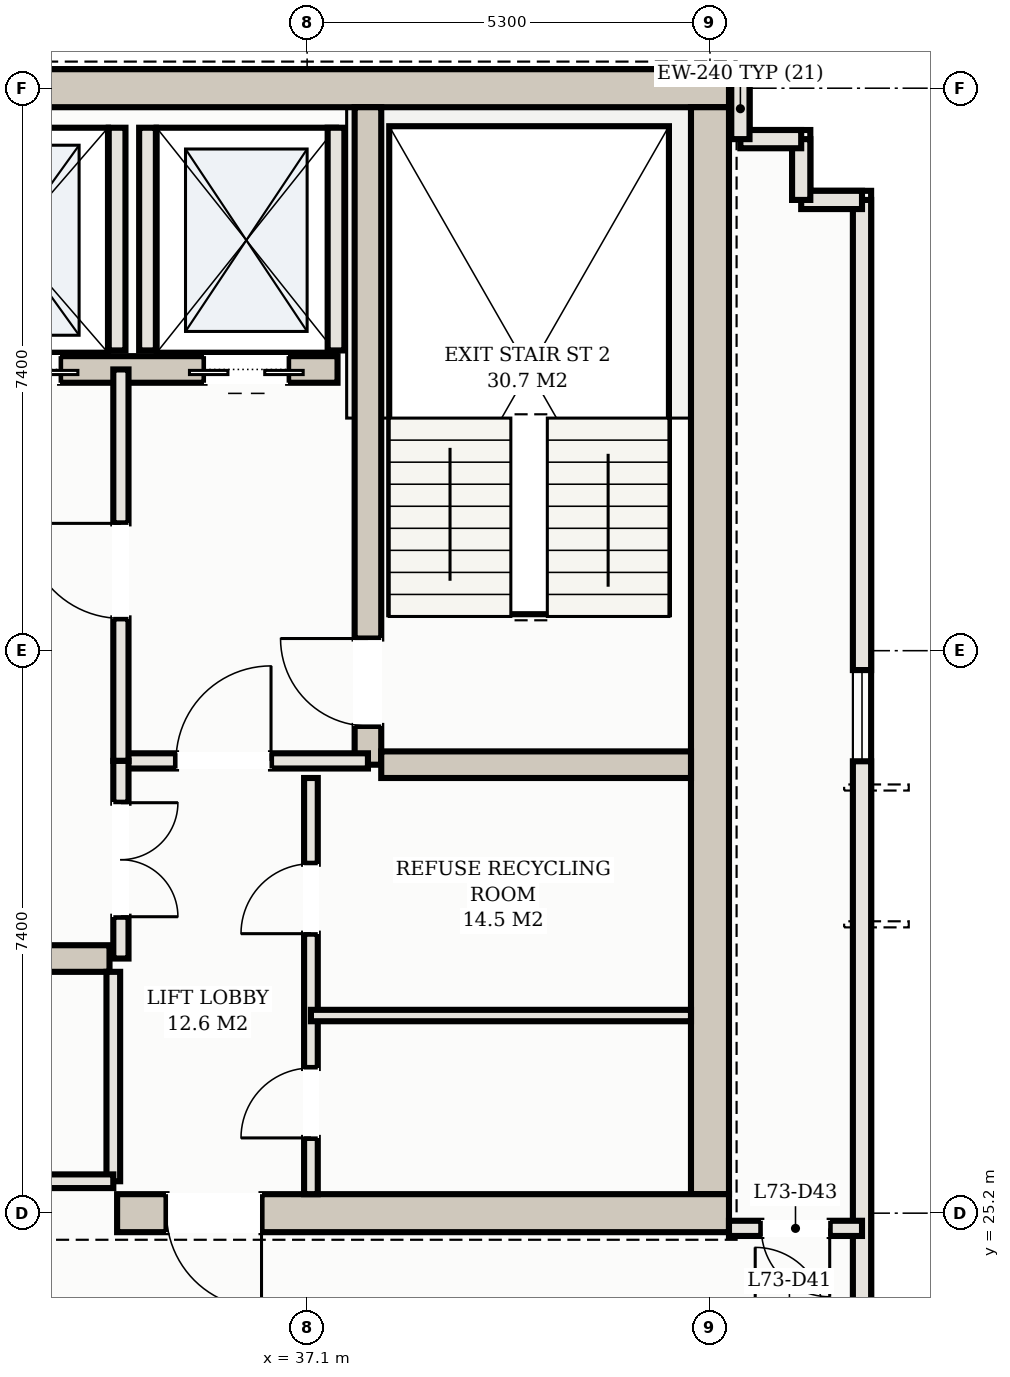
"""IFC4 building model, lengths in metres.
Left out: names, types, materials, properties, quantities, classifications, styles, units other than length and angle.
Written with IfcOpenShell. Run it as: python <this file> out.ifc"""

import sys

from ifc_helpers import new_model, si_unit, direction, frame, frame_2d, origin, place, context, subcontext, project, spatial, rectangle, extrude, element, fill, save


model = new_model("IFC4")
c1 = context("Model", 3, precision=1e-05, world=origin(), true_north=direction((0.0, 1.0)))
c2 = subcontext(c1, "Body", "Model", "MODEL_VIEW")
j1 = project(units=[si_unit("LENGTHUNIT", "METRE"), si_unit("PLANEANGLEUNIT", "RADIAN")], contexts=[c1])
p1 = place(None, origin())
s1 = spatial("IfcSite", under=j1, at=p1, CompositionType="ELEMENT")
p2 = place(p1, origin())
s2 = spatial("IfcBuilding", under=s1, at=p2, CompositionType="ELEMENT")
p3 = place(p2, frame((0.0, 0.0, 262.7)))
s3 = spatial("IfcBuildingStorey", under=s2, at=p3, CompositionType="ELEMENT", Elevation=262.7)
p4 = place(p3, frame((10.35, 40.0, 0.0), z_axis=(0.0, 0.0, 1.0), x_axis=(1.0, 0.0, 0.0)))
e1 = element("IfcWall", 1, at=p4, inside=s3, PredefinedType="SHEAR", context=c2, shape_type="SweptSolid", body=[
    extrude(rectangle(XDim=32.3, YDim=0.5, at=frame_2d((16.15, 0.0))), origin(), (0.0, 0.0, 1.0), 3.04),
])
p5 = place(p3, frame((42.4, 25.45, 0.0), z_axis=(0.0, 0.0, 1.0), x_axis=(0.0, 1.0, 0.0)))
e2 = element("IfcWall", 2, at=p5, inside=s3, PredefinedType="SHEAR", context=c2, shape_type="SweptSolid", body=[
    extrude(rectangle(XDim=14.3, YDim=0.5, at=frame_2d((7.15, 0.0))), origin(), (0.0, 0.0, 1.0), 3.04),
])
p6 = place(p3, frame((34.6, 25.2, 0.0), z_axis=(0.0, 0.0, 1.0), x_axis=(1.0, 0.0, 0.0)))
e3 = element("IfcWall", 3, at=p6, inside=s3, PredefinedType="SHEAR", context=c2, shape_type="SweptSolid", body=[
    extrude(rectangle(XDim=8.05, YDim=0.5, at=frame_2d((4.025, 0.0))), origin(), (0.0, 0.0, 1.0), 3.04),
])
p7 = place(p6, frame((0.65, 0.0, 0.0)))
e4 = element("IfcOpeningElement", 4, at=p7, cuts=e3, PredefinedType="OPENING", context=c2, shape_type="SweptSolid", body=[
    extrude(rectangle(XDim=1.25, YDim=2.2, at=frame_2d((0.625, 1.1))), frame((0.0, 0.26, 0.0), z_axis=(0.0, -1.0, 0.0), x_axis=(1.0, 0.0, 0.0)), (0.0, 0.0, 1.0), 0.52),
])
p8 = place(p3, frame((37.9, 31.1, 0.0), z_axis=(0.0, 0.0, 1.0), x_axis=(0.0, 1.0, 0.0)))
e5 = element("IfcWall", 5, at=p8, inside=s3, PredefinedType="SHEAR", context=c2, shape_type="SweptSolid", body=[
    extrude(rectangle(XDim=8.65, YDim=0.35, at=frame_2d((4.325, 0.0))), origin(), (0.0, 0.0, 1.0), 3.04),
])
p9 = place(p8, frame((0.51, 0.0, 0.0)))
e6 = element("IfcOpeningElement", 6, at=p9, cuts=e5, PredefinedType="OPENING", context=c2, shape_type="SweptSolid", body=[
    extrude(rectangle(XDim=1.15, YDim=2.2, at=frame_2d((0.575, 1.1))), frame((0.0, 0.185, 0.0), z_axis=(0.0, -1.0, 0.0), x_axis=(1.0, 0.0, 0.0)), (0.0, 0.0, 1.0), 0.37),
])
p10 = place(p3, frame((38.075, 31.1, 0.0), z_axis=(0.0, 0.0, 1.0), x_axis=(1.0, 0.0, 0.0)))
e7 = element("IfcWall", 7, at=p10, inside=s3, PredefinedType="SHEAR", context=c2, shape_type="SweptSolid", body=[
    extrude(rectangle(XDim=4.075, YDim=0.35, at=frame_2d((2.038, 0.0))), origin(), (0.0, 0.0, 1.0), 3.04),
])
p11 = place(p3, frame((15.5, 36.3, 0.0), z_axis=(0.0, 0.0, 1.0), x_axis=(1.0, 0.0, 0.0)))
e8 = element("IfcWall", 8, at=p11, inside=s3, PredefinedType="SHEAR", context=c2, shape_type="SweptSolid", body=[
    extrude(rectangle(XDim=22.0, YDim=0.35, at=frame_2d((11.0, 0.0))), origin(), (0.0, 0.0, 1.0), 3.04),
])
p12 = place(p11, frame((0.65, 0.0, 0.0)))
e9 = element("IfcOpeningElement", 9, at=p12, cuts=e8, PredefinedType="OPENING", context=c2, shape_type="SweptSolid", body=[
    extrude(rectangle(XDim=1.1, YDim=2.15, at=frame_2d((0.55, 1.075))), frame((0.0, 0.185, 0.0), z_axis=(0.0, -1.0, 0.0), x_axis=(1.0, 0.0, 0.0)), (0.0, 0.0, 1.0), 0.37),
])
p13 = place(p11, frame((20.25, 0.0, 0.0)))
e10 = element("IfcOpeningElement", 10, at=p13, cuts=e8, PredefinedType="OPENING", context=c2, shape_type="SweptSolid", body=[
    extrude(rectangle(XDim=1.1, YDim=2.15, at=frame_2d((0.55, 1.075))), frame((0.0, 0.185, 0.0), z_axis=(0.0, -1.0, 0.0), x_axis=(1.0, 0.0, 0.0)), (0.0, 0.0, 1.0), 0.37),
])
p14 = place(p11, frame((17.05, 0.0, 0.0)))
e11 = element("IfcOpeningElement", 11, at=p14, cuts=e8, PredefinedType="OPENING", context=c2, shape_type="SweptSolid", body=[
    extrude(rectangle(XDim=1.3, YDim=2.2, at=frame_2d((0.65, 1.1))), frame((0.0, 0.185, 0.0), z_axis=(0.0, -1.0, 0.0), x_axis=(1.0, 0.0, 0.0)), (0.0, 0.0, 1.0), 0.37),
])
p15 = place(p11, frame((3.95, 0.0, 0.0)))
e12 = element("IfcOpeningElement", 12, at=p15, cuts=e8, PredefinedType="OPENING", context=c2, shape_type="SweptSolid", body=[
    extrude(rectangle(XDim=1.1, YDim=2.15, at=frame_2d((0.55, 1.075))), frame((0.0, 0.185, 0.0), z_axis=(0.0, -1.0, 0.0), x_axis=(1.0, 0.0, 0.0)), (0.0, 0.0, 1.0), 0.37),
])
p16 = place(p11, frame((6.55, 0.0, 0.0)))
e13 = element("IfcOpeningElement", 13, at=p16, cuts=e8, PredefinedType="OPENING", context=c2, shape_type="SweptSolid", body=[
    extrude(rectangle(XDim=1.1, YDim=2.15, at=frame_2d((0.55, 1.075))), frame((0.0, 0.185, 0.0), z_axis=(0.0, -1.0, 0.0), x_axis=(1.0, 0.0, 0.0)), (0.0, 0.0, 1.0), 0.37),
])
p17 = place(p11, frame((9.15, 0.0, 0.0)))
e14 = element("IfcOpeningElement", 14, at=p17, cuts=e8, PredefinedType="OPENING", context=c2, shape_type="SweptSolid", body=[
    extrude(rectangle(XDim=1.1, YDim=2.15, at=frame_2d((0.55, 1.075))), frame((0.0, 0.185, 0.0), z_axis=(0.0, -1.0, 0.0), x_axis=(1.0, 0.0, 0.0)), (0.0, 0.0, 1.0), 0.37),
])
p18 = place(p3, frame((18.5, 28.55, 0.0), z_axis=(0.0, 0.0, 1.0), x_axis=(1.0, 0.0, 0.0)))
e15 = element("IfcWall", 15, at=p18, inside=s3, PredefinedType="SHEAR", context=c2, shape_type="SweptSolid", body=[
    extrude(rectangle(XDim=16.0, YDim=0.35, at=frame_2d((8.0, 0.0))), origin(), (0.0, 0.0, 1.0), 3.04),
])
for number, where, z_axis, x_axis in (
    (16, (35.0, 36.55, 0.0), (0.0, 0.0, 1.0), (0.0, 1.0, 0.0)),
    (17, (37.48, 36.55, 0.0), (0.0, 0.0, 1.0), (0.0, 1.0, 0.0)),
    (18, (34.6, 36.55, 0.0), (0.0, 0.0, 1.0), (0.0, 1.0, 0.0)),
):
    element("IfcWall", number, at=place(p3, frame(where, z_axis=z_axis, x_axis=x_axis)), inside=s3, PredefinedType="SOLIDWALL", context=c2, shape_type="SweptSolid", body=[
        extrude(rectangle(XDim=2.93, YDim=0.22, at=frame_2d((1.465, 0.0))), origin(), (0.0, 0.0, 1.0), 3.04),
    ])
p19 = place(p3, frame((44.4, 12.52, 0.0), z_axis=(0.0, 0.0, 1.0), x_axis=(0.0, 1.0, 0.0)))
e19 = element("IfcWall", 19, at=p19, inside=s3, PredefinedType="SOLIDWALL", context=c2, shape_type="SweptSolid", body=[
    extrude(rectangle(XDim=26.01, YDim=0.24, at=frame_2d((13.005, 0.0))), origin(), (0.0, 0.0, 1.0), 3.04),
])
p20 = place(p19, frame((4.48, 0.0, 0.0)))
e20 = element("IfcOpeningElement", 20, at=p20, cuts=e19, PredefinedType="OPENING", context=c2, shape_type="SweptSolid", body=[
    extrude(rectangle(XDim=1.8, YDim=2.2, at=frame_2d((0.9, 1.1))), frame((0.0, 0.13, 0.0), z_axis=(0.0, -1.0, 0.0), x_axis=(1.0, 0.0, 0.0)), (0.0, 0.0, 1.0), 0.26),
])
p21 = place(p19, frame((0.426, 0.0, 0.75)))
e21 = element("IfcOpeningElement", 21, at=p21, cuts=e19, PredefinedType="OPENING", context=c2, shape_type="SweptSolid", body=[
    extrude(rectangle(XDim=1.5, YDim=1.6, at=frame_2d((0.75, 0.8))), frame((0.0, 0.13, 0.0), z_axis=(0.0, -1.0, 0.0), x_axis=(1.0, 0.0, 0.0)), (0.0, 0.0, 1.0), 0.26),
])
p22 = place(p19, frame((2.784, 0.0, 0.75)))
e22 = element("IfcOpeningElement", 22, at=p22, cuts=e19, PredefinedType="OPENING", context=c2, shape_type="SweptSolid", body=[
    extrude(rectangle(XDim=1.2, YDim=1.5, at=frame_2d((0.6, 0.75))), frame((0.0, 0.13, 0.0), z_axis=(0.0, -1.0, 0.0), x_axis=(1.0, 0.0, 0.0)), (0.0, 0.0, 1.0), 0.26),
])
p23 = place(p19, frame((8.185, 0.0, 0.75)))
e23 = element("IfcOpeningElement", 23, at=p23, cuts=e19, PredefinedType="OPENING", context=c2, shape_type="SweptSolid", body=[
    extrude(rectangle(XDim=1.2, YDim=1.5, at=frame_2d((0.6, 0.75))), frame((0.0, 0.13, 0.0), z_axis=(0.0, -1.0, 0.0), x_axis=(1.0, 0.0, 0.0)), (0.0, 0.0, 1.0), 0.26),
])
p24 = place(p19, frame((18.625, 0.0, 0.75)))
e24 = element("IfcOpeningElement", 24, at=p24, cuts=e19, PredefinedType="OPENING", context=c2, shape_type="SweptSolid", body=[
    extrude(rectangle(XDim=1.2, YDim=1.5, at=frame_2d((0.6, 0.75))), frame((0.0, 0.13, 0.0), z_axis=(0.0, -1.0, 0.0), x_axis=(1.0, 0.0, 0.0)), (0.0, 0.0, 1.0), 0.26),
])
p25 = place(p3, frame((44.4, 38.53, 0.0), z_axis=(0.0, 0.0, 1.0), x_axis=(-1.0, 0.0, 0.0)))
e25 = element("IfcWall", 25, at=p25, inside=s3, PredefinedType="SOLIDWALL", context=c2, shape_type="SweptSolid", body=[
    extrude(rectangle(XDim=0.8, YDim=0.24, at=frame_2d((0.4, 0.0))), origin(), (0.0, 0.0, 1.0), 3.04),
])
for number, where, z_axis, x_axis in (
    (26, (43.6, 38.53, 0.0), (0.0, 0.0, 1.0), (0.0, 1.0, 0.0)),
    (27, (43.6, 39.33, 0.0), (0.0, 0.0, 1.0), (-1.0, 0.0, 0.0)),
):
    element("IfcWall", number, at=place(p3, frame(where, z_axis=z_axis, x_axis=x_axis)), inside=s3, PredefinedType="SOLIDWALL", context=c2, shape_type="SweptSolid", body=[
        extrude(rectangle(XDim=0.8, YDim=0.24, at=frame_2d((0.4, 0.0))), origin(), (0.0, 0.0, 1.0), 3.04),
    ])
p26 = place(p3, frame((42.8, 39.33, 0.0), z_axis=(0.0, 0.0, 1.0), x_axis=(0.0, 1.0, 0.0)))
e28 = element("IfcWall", 28, at=p26, inside=s3, PredefinedType="SOLIDWALL", context=c2, shape_type="SweptSolid", body=[
    extrude(rectangle(XDim=0.8, YDim=0.24, at=frame_2d((0.4, 0.0))), origin(), (0.0, 0.0, 1.0), 3.04),
])
p27 = place(p3, frame((34.65, 31.15, 0.0), z_axis=(0.0, 0.0, 1.0), x_axis=(1.0, 0.0, 0.0)))
e29 = element("IfcWall", 29, at=p27, inside=s3, PredefinedType="PARTITIONING", context=c2, shape_type="SweptSolid", body=[
    extrude(rectangle(XDim=3.25, YDim=0.2, at=frame_2d((1.625, 0.0))), origin(), (0.0, 0.0, 1.0), 2.38),
])
p28 = place(p27, frame((0.725, 0.0, 0.0)))
e30 = element("IfcOpeningElement", 30, at=p28, cuts=e29, PredefinedType="OPENING", context=c2, shape_type="SweptSolid", body=[
    extrude(rectangle(XDim=1.25, YDim=2.2, at=frame_2d((0.625, 1.1))), frame((0.0, 0.11, 0.0), z_axis=(0.0, -1.0, 0.0), x_axis=(1.0, 0.0, 0.0)), (0.0, 0.0, 1.0), 0.22),
])
p29 = place(p3, frame((34.65, 31.15, 0.0), z_axis=(0.0, 0.0, 1.0), x_axis=(0.0, 1.0, 0.0)))
e31 = element("IfcWall", 31, at=p29, inside=s3, PredefinedType="PARTITIONING", context=c2, shape_type="SweptSolid", body=[
    extrude(rectangle(XDim=5.15, YDim=0.2, at=frame_2d((2.575, 0.0))), origin(), (0.0, 0.0, 1.0), 2.38),
])
p30 = place(p29, frame((1.875, 0.0, 0.0)))
e32 = element("IfcOpeningElement", 32, at=p30, cuts=e31, PredefinedType="OPENING", context=c2, shape_type="SweptSolid", body=[
    extrude(rectangle(XDim=1.25, YDim=2.2, at=frame_2d((0.625, 1.1))), frame((0.0, 0.11, 0.0), z_axis=(0.0, -1.0, 0.0), x_axis=(1.0, 0.0, 0.0)), (0.0, 0.0, 1.0), 0.22),
])
p31 = place(p3, frame((37.15, 25.45, 0.0), z_axis=(0.0, 0.0, 1.0), x_axis=(0.0, 1.0, 0.0)))
e33 = element("IfcWall", 33, at=p31, inside=s3, PredefinedType="PARTITIONING", context=c2, shape_type="SweptSolid", body=[
    extrude(rectangle(XDim=5.475, YDim=0.18, at=frame_2d((2.738, 0.0))), origin(), (0.0, 0.0, 1.0), 2.38),
])
p32 = place(p31, frame((0.74, 0.0, 0.0)))
e34 = element("IfcOpeningElement", 34, at=p32, cuts=e33, PredefinedType="OPENING", context=c2, shape_type="SweptSolid", body=[
    extrude(rectangle(XDim=0.92, YDim=2.15, at=frame_2d((0.46, 1.075))), frame((0.0, 0.1, 0.0), z_axis=(0.0, -1.0, 0.0), x_axis=(1.0, 0.0, 0.0)), (0.0, 0.0, 1.0), 0.2),
])
p33 = place(p31, frame((3.427, 0.0, 0.0)))
e35 = element("IfcOpeningElement", 35, at=p33, cuts=e33, PredefinedType="OPENING", context=c2, shape_type="SweptSolid", body=[
    extrude(rectangle(XDim=0.92, YDim=2.15, at=frame_2d((0.46, 1.075))), frame((0.0, 0.1, 0.0), z_axis=(0.0, -1.0, 0.0), x_axis=(1.0, 0.0, 0.0)), (0.0, 0.0, 1.0), 0.2),
])
p34 = place(p3, frame((37.15, 27.8, 0.0), z_axis=(0.0, 0.0, 1.0), x_axis=(1.0, 0.0, 0.0)))
e36 = element("IfcWall", 36, at=p34, inside=s3, PredefinedType="PARTITIONING", context=c2, shape_type="SweptSolid", body=[
    extrude(rectangle(XDim=5.0, YDim=0.15, at=frame_2d((2.5, 0.0))), origin(), (0.0, 0.0, 1.0), 2.38),
])
p35 = place(p3, frame((34.65, 28.55, 0.0), z_axis=(0.0, 0.0, 1.0), x_axis=(0.0, 1.0, 0.0)))
e37 = element("IfcWall", 37, at=p35, inside=s3, PredefinedType="PARTITIONING", context=c2, shape_type="SweptSolid", body=[
    extrude(rectangle(XDim=2.6, YDim=0.2, at=frame_2d((1.3, 0.0))), origin(), (0.0, 0.0, 1.0), 2.38),
])
p36 = place(p35, frame((0.55, 0.0, 0.0)))
e38 = element("IfcOpeningElement", 38, at=p36, cuts=e37, PredefinedType="OPENING", context=c2, shape_type="SweptSolid", body=[
    extrude(rectangle(XDim=1.5, YDim=2.25, at=frame_2d((0.75, 1.125))), frame((0.0, 0.11, 0.0), z_axis=(0.0, -1.0, 0.0), x_axis=(1.0, 0.0, 0.0)), (0.0, 0.0, 1.0), 0.22),
])
p37 = place(p3, frame((34.55, 25.62, 0.0), z_axis=(0.0, 0.0, 1.0), x_axis=(0.0, 1.0, 0.0)))
e39 = element("IfcWall", 39, at=p37, inside=s3, PredefinedType="PARTITIONING", context=c2, shape_type="SweptSolid", body=[
    extrude(rectangle(XDim=2.755, YDim=0.18, at=frame_2d((1.377, 0.0))), origin(), (0.0, 0.0, 1.0), 2.38),
])
p38 = place(p3, frame((26.65, 25.62, 0.0), z_axis=(0.0, 0.0, 1.0), x_axis=(1.0, 0.0, 0.0)))
e40 = element("IfcWall", 40, at=p38, inside=s3, PredefinedType="PARTITIONING", context=c2, shape_type="SweptSolid", body=[
    extrude(rectangle(XDim=7.9, YDim=0.18, at=frame_2d((3.95, 0.0))), origin(), (0.0, 0.0, 1.0), 2.38),
])
p39 = place(p38, frame((3.34, 0.0, 0.0)))
e41 = element("IfcOpeningElement", 41, at=p39, cuts=e40, PredefinedType="OPENING", context=c2, shape_type="SweptSolid", body=[
    extrude(rectangle(XDim=0.92, YDim=2.15, at=frame_2d((0.46, 1.075))), frame((0.0, 0.1, 0.0), z_axis=(0.0, -1.0, 0.0), x_axis=(1.0, 0.0, 0.0)), (0.0, 0.0, 1.0), 0.2),
])
p40 = place(p3, frame((42.65, 25.0, 0.0), z_axis=(0.0, 0.0, 1.0), x_axis=(1.0, 0.0, 0.0)))
e42 = element("IfcWall", 42, at=p40, inside=s3, PredefinedType="PARTITIONING", context=c2, shape_type="SweptSolid", body=[
    extrude(rectangle(XDim=1.75, YDim=0.2, at=frame_2d((0.875, 0.0))), origin(), (0.0, 0.0, 1.0), 2.38),
])
p41 = place(p40, frame((0.425, 0.0, 0.0)))
e43 = element("IfcOpeningElement", 43, at=p41, cuts=e42, PredefinedType="OPENING", context=c2, shape_type="SweptSolid", body=[
    extrude(rectangle(XDim=0.9, YDim=2.15, at=frame_2d((0.45, 1.075))), frame((0.0, 0.11, 0.0), z_axis=(0.0, -1.0, 0.0), x_axis=(1.0, 0.0, 0.0)), (0.0, 0.0, 1.0), 0.22),
])
p42 = place(p13, frame((1.1, 0.0, 0.0), z_axis=(0.0, 0.0, 1.0), x_axis=(-1.0, 0.0, 0.0)))
e44 = element("IfcDoor", 44, at=p42, inside=s3, OperationType="DOUBLE_DOOR_SLIDING", PredefinedType="DOOR", context=c2, shape_type="SweptSolid", body=[
    extrude(rectangle(XDim=1.1, YDim=2.15, at=frame_2d((0.55, 1.075))), frame((0.0, 0.025, 0.0), z_axis=(0.0, -1.0, 0.0), x_axis=(1.0, 0.0, 0.0)), (0.0, 0.0, 1.0), 0.05),
])
fill(e10, e44)
p43 = place(p14, frame((1.3, 0.0, 0.0), z_axis=(0.0, 0.0, 1.0), x_axis=(-1.0, 0.0, 0.0)))
e45 = element("IfcDoor", 45, at=p43, inside=s3, OperationType="DOUBLE_DOOR_SLIDING", PredefinedType="DOOR", context=c2, shape_type="SweptSolid", body=[
    extrude(rectangle(XDim=1.3, YDim=2.2, at=frame_2d((0.65, 1.1))), frame((0.0, 0.025, 0.0), z_axis=(0.0, -1.0, 0.0), x_axis=(1.0, 0.0, 0.0)), (0.0, 0.0, 1.0), 0.05),
])
fill(e11, e45)
p44 = place(p7, frame((1.25, 0.0, 0.0), z_axis=(0.0, 0.0, 1.0), x_axis=(-1.0, 0.0, 0.0)))
e46 = element("IfcDoor", 46, at=p44, inside=s3, OperationType="SINGLE_SWING_LEFT", PredefinedType="DOOR", context=c2, shape_type="SweptSolid", body=[
    extrude(rectangle(XDim=1.25, YDim=2.2, at=frame_2d((0.625, 1.1))), frame((0.0, 0.025, 0.0), z_axis=(0.0, -1.0, 0.0), x_axis=(1.0, 0.0, 0.0)), (0.0, 0.0, 1.0), 0.05),
])
fill(e4, e46)
p45 = place(p28, origin())
e47 = element("IfcDoor", 47, at=p45, inside=s3, OperationType="SINGLE_SWING_RIGHT", PredefinedType="DOOR", context=c2, shape_type="SweptSolid", body=[
    extrude(rectangle(XDim=1.25, YDim=2.2, at=frame_2d((0.625, 1.1))), frame((0.0, 0.025, 0.0), z_axis=(0.0, -1.0, 0.0), x_axis=(1.0, 0.0, 0.0)), (0.0, 0.0, 1.0), 0.05),
])
fill(e30, e47)
p46 = place(p30, origin())
e48 = element("IfcDoor", 48, at=p46, inside=s3, OperationType="SINGLE_SWING_RIGHT", PredefinedType="DOOR", context=c2, shape_type="SweptSolid", body=[
    extrude(rectangle(XDim=1.25, YDim=2.2, at=frame_2d((0.625, 1.1))), frame((0.0, 0.025, 0.0), z_axis=(0.0, -1.0, 0.0), x_axis=(1.0, 0.0, 0.0)), (0.0, 0.0, 1.0), 0.05),
])
fill(e32, e48)
p47 = place(p9, origin())
e49 = element("IfcDoor", 49, at=p47, inside=s3, OperationType="SINGLE_SWING_RIGHT", PredefinedType="DOOR", context=c2, shape_type="SweptSolid", body=[
    extrude(rectangle(XDim=1.15, YDim=2.2, at=frame_2d((0.575, 1.1))), frame((0.0, 0.025, 0.0), z_axis=(0.0, -1.0, 0.0), x_axis=(1.0, 0.0, 0.0)), (0.0, 0.0, 1.0), 0.05),
])
fill(e6, e49)
p48 = place(p32, origin())
e50 = element("IfcDoor", 50, at=p48, inside=s3, OperationType="SINGLE_SWING_LEFT", PredefinedType="DOOR", context=c2, shape_type="SweptSolid", body=[
    extrude(rectangle(XDim=0.92, YDim=2.15, at=frame_2d((0.46, 1.075))), frame((0.0, 0.025, 0.0), z_axis=(0.0, -1.0, 0.0), x_axis=(1.0, 0.0, 0.0)), (0.0, 0.0, 1.0), 0.05),
])
fill(e34, e50)
p49 = place(p33, origin())
e51 = element("IfcDoor", 51, at=p49, inside=s3, OperationType="SINGLE_SWING_LEFT", PredefinedType="DOOR", context=c2, shape_type="SweptSolid", body=[
    extrude(rectangle(XDim=0.92, YDim=2.15, at=frame_2d((0.46, 1.075))), frame((0.0, 0.025, 0.0), z_axis=(0.0, -1.0, 0.0), x_axis=(1.0, 0.0, 0.0)), (0.0, 0.0, 1.0), 0.05),
])
fill(e35, e51)
p50 = place(p36, frame((1.5, 0.0, 0.0), z_axis=(0.0, 0.0, 1.0), x_axis=(-1.0, 0.0, 0.0)))
e52 = element("IfcDoor", 52, at=p50, inside=s3, OperationType="DOUBLE_DOOR_SINGLE_SWING", PredefinedType="DOOR", context=c2, shape_type="SweptSolid", body=[
    extrude(rectangle(XDim=1.5, YDim=2.25, at=frame_2d((0.75, 1.125))), frame((0.0, 0.025, 0.0), z_axis=(0.0, -1.0, 0.0), x_axis=(1.0, 0.0, 0.0)), (0.0, 0.0, 1.0), 0.05),
])
fill(e38, e52)
p51 = place(p41, frame((0.9, 0.0, 0.0), z_axis=(0.0, 0.0, 1.0), x_axis=(-1.0, 0.0, 0.0)))
e53 = element("IfcDoor", 53, at=p51, inside=s3, OperationType="SINGLE_SWING_LEFT", PredefinedType="DOOR", context=c2, shape_type="SweptSolid", body=[
    extrude(rectangle(XDim=0.9, YDim=2.15, at=frame_2d((0.45, 1.075))), frame((0.0, 0.025, 0.0), z_axis=(0.0, -1.0, 0.0), x_axis=(1.0, 0.0, 0.0)), (0.0, 0.0, 1.0), 0.05),
])
fill(e43, e53)
p52 = place(p24, origin())
e54 = element("IfcWindow", 54, at=p52, inside=s3, PartitioningType="SINGLE_PANEL", PredefinedType="WINDOW", context=c2, shape_type="SweptSolid", body=[
    extrude(rectangle(XDim=1.2, YDim=1.5, at=frame_2d((0.6, 0.75))), frame((0.0, 0.03, 0.0), z_axis=(0.0, -1.0, 0.0), x_axis=(1.0, 0.0, 0.0)), (0.0, 0.0, 1.0), 0.06),
])
fill(e24, e54)
save(model, sys.argv[1])
